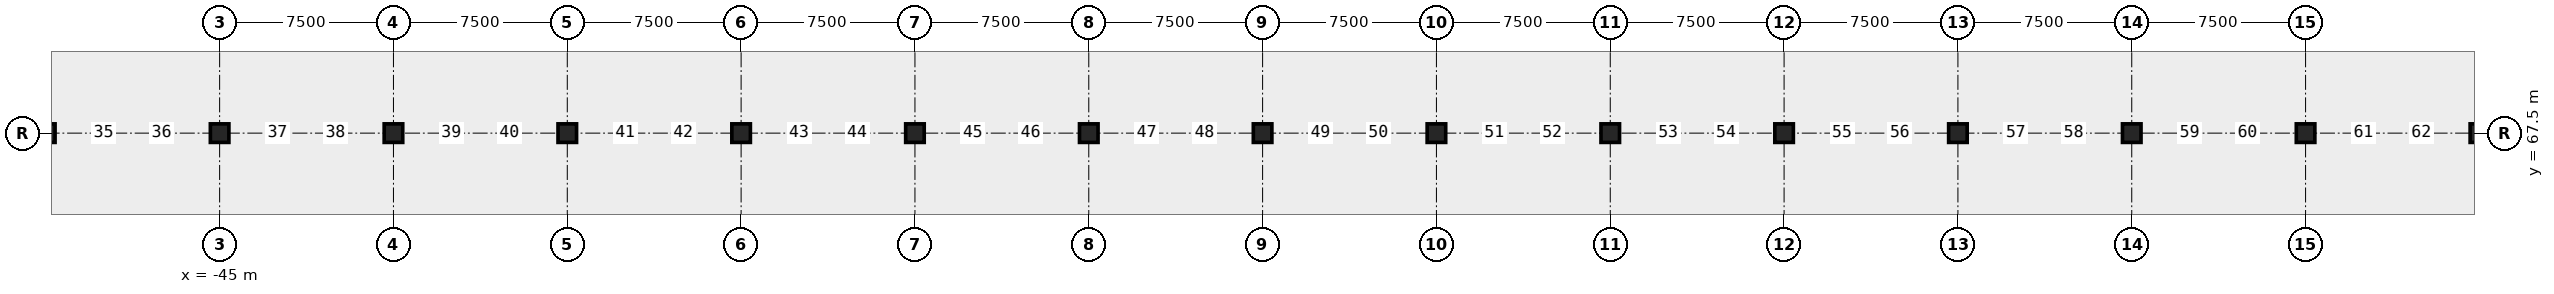
"""IFC4 building model, lengths in metres.
Left out: names, types, materials, properties, quantities, classifications, styles, units other than length and angle.
Written with IfcOpenShell. Run it as: python <this file> out.ifc"""

import sys

from ifc_helpers import new_model, si_unit, direction, frame, origin, origin_2d, place, context, subcontext, project, spatial, rectangle, extrude, element, save


model = new_model("IFC4")
c1 = context("Model", 3, precision=1e-05, world=origin(), true_north=direction((0.0, 1.0)))
c2 = subcontext(c1, "Body", "Model", "MODEL_VIEW")
j1 = project(units=[si_unit("LENGTHUNIT", "METRE"), si_unit("PLANEANGLEUNIT", "RADIAN")], contexts=[c1])
p1 = place(None, origin())
s1 = spatial("IfcSite", under=j1, at=p1, CompositionType="ELEMENT")
p2 = place(p1, origin())
s2 = spatial("IfcBuilding", under=s1, at=p2, CompositionType="ELEMENT")
p3 = place(p2, frame((0.0, 0.0, -5.5)))
s3 = spatial("IfcBuildingStorey", under=s2, at=p3, CompositionType="ELEMENT", Elevation=-5.5)
for number, where, z_axis, x_axis in (
    (1, (-52.5, 67.5, -0.42), (0.0, 0.0, 1.0), (1.0, 0.0, 0.0)),
    (2, (-45.0, 67.5, -0.42), (0.0, 0.0, 1.0), (1.0, 0.0, 0.0)),
    (3, (-37.5, 67.5, -0.42), (0.0, 0.0, 1.0), (1.0, 0.0, 0.0)),
    (4, (-30.0, 67.5, -0.42), (0.0, 0.0, 1.0), (1.0, 0.0, 0.0)),
    (5, (-22.5, 67.5, -0.42), (0.0, 0.0, 1.0), (1.0, 0.0, 0.0)),
    (6, (-15.0, 67.5, -0.42), (0.0, 0.0, 1.0), (1.0, 0.0, 0.0)),
    (7, (-7.5, 67.5, -0.42), (0.0, 0.0, 1.0), (1.0, 0.0, 0.0)),
    (8, (0.0, 67.5, -0.42), (0.0, 0.0, 1.0), (1.0, 0.0, 0.0)),
    (9, (7.5, 67.5, -0.42), (0.0, 0.0, 1.0), (1.0, 0.0, 0.0)),
    (10, (15.0, 67.5, -0.42), (0.0, 0.0, 1.0), (1.0, 0.0, 0.0)),
    (11, (22.5, 67.5, -0.42), (0.0, 0.0, 1.0), (1.0, 0.0, 0.0)),
    (12, (30.0, 67.5, -0.42), (0.0, 0.0, 1.0), (1.0, 0.0, 0.0)),
    (13, (37.5, 67.5, -0.42), (0.0, 0.0, 1.0), (1.0, 0.0, 0.0)),
    (14, (45.0, 67.5, -0.42), (0.0, 0.0, 1.0), (1.0, 0.0, 0.0)),
    (15, (52.5, 67.5, -0.42), (0.0, 0.0, 1.0), (1.0, 0.0, 0.0)),
):
    element("IfcColumn", number, at=place(p3, frame(where, z_axis=z_axis, x_axis=x_axis)), inside=s3, PredefinedType="COLUMN", context=c2, shape_type="SweptSolid", body=[
        extrude(rectangle(XDim=0.8, YDim=0.8, at=origin_2d()), origin(), (0.0, 0.0, 1.0), 5.72),
    ])
save(model, sys.argv[1])
